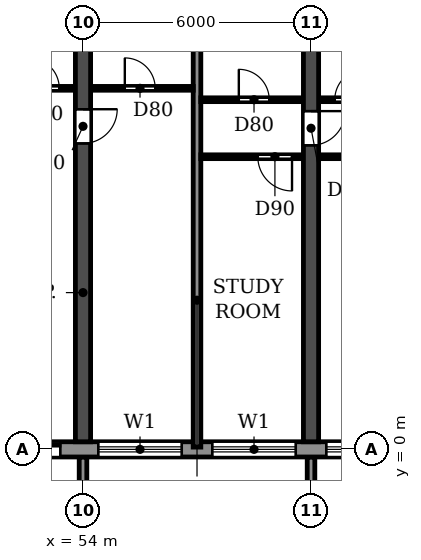
"""IFC4 building model, lengths in metres.
Left out: names, types, materials, properties, quantities, classifications, styles, units other than length and angle.
Written with IfcOpenShell. Run it as: python <this file> out.ifc"""

import sys

from ifc_helpers import new_model, si_unit, direction, frame, frame_2d, origin, place, context, subcontext, project, spatial, polyline, rectangle, outline, extrude, source, transform, mapped, element, fill, save


model = new_model("IFC4")
c1 = context("Model", 3, precision=1e-05, world=origin(), true_north=direction((0.0, 1.0)))
c2 = subcontext(c1, "Body", "Model", "MODEL_VIEW")
j1 = project(units=[si_unit("LENGTHUNIT", "METRE"), si_unit("PLANEANGLEUNIT", "RADIAN")], contexts=[c1])
p1 = place(None, origin())
s1 = spatial("IfcSite", under=j1, at=p1, CompositionType="ELEMENT")
p2 = place(p1, origin())
s2 = spatial("IfcBuilding", under=s1, at=p2, CompositionType="ELEMENT")
p3 = place(p2, frame((0.0, 0.0, 43.2)))
s3 = spatial("IfcBuildingStorey", under=s2, at=p3, CompositionType="ELEMENT", Elevation=43.2)
p4 = place(p3, frame((54.0, 0.2, 0.0), z_axis=(0.0, 0.0, 1.0), x_axis=(0.0, 1.0, 0.0)))
e1 = element("IfcWall", 1, at=p4, inside=s3, PredefinedType="SHEAR", context=c2, shape_type="SweptSolid", body=[
    extrude(rectangle(XDim=11.65, YDim=0.4, at=frame_2d((5.825, 0.0))), origin(), (0.0, 0.0, 1.0), 3.05),
])
p5 = place(p4, frame((7.85, 0.0, 0.0)))
e2 = element("IfcOpeningElement", 2, at=p5, cuts=e1, PredefinedType="OPENING", context=c2, shape_type="SweptSolid", body=[
    extrude(rectangle(XDim=0.9, YDim=2.1, at=frame_2d((0.45, 1.05))), frame((0.0, 0.21, 0.0), z_axis=(0.0, -1.0, 0.0), x_axis=(1.0, 0.0, 0.0)), (0.0, 0.0, 1.0), 0.42),
])
p6 = place(p3, frame((60.0, 0.2, 0.0), z_axis=(0.0, 0.0, 1.0), x_axis=(0.0, 1.0, 0.0)))
e3 = element("IfcWall", 3, at=p6, inside=s3, PredefinedType="SHEAR", context=c2, shape_type="SweptSolid", body=[
    extrude(rectangle(XDim=11.65, YDim=0.4, at=frame_2d((5.825, 0.0))), origin(), (0.0, 0.0, 1.0), 3.05),
])
p7 = place(p6, frame((7.8, 0.0, 0.0)))
e4 = element("IfcOpeningElement", 4, at=p7, cuts=e3, PredefinedType="OPENING", context=c2, shape_type="SweptSolid", body=[
    extrude(rectangle(XDim=0.9, YDim=2.1, at=frame_2d((0.45, 1.05))), frame((0.0, 0.21, 0.0), z_axis=(0.0, -1.0, 0.0), x_axis=(1.0, 0.0, 0.0)), (0.0, 0.0, 1.0), 0.42),
])
p8 = place(p3, frame((4.683, 0.0, 0.0), z_axis=(0.0, 0.0, 1.0), x_axis=(1.0, 0.0, 0.0)))
e5 = element("IfcWall", 5, at=p8, inside=s3, PredefinedType="STANDARD", context=c2, shape_type="SweptSolid", body=[
    extrude(rectangle(XDim=92.634, YDim=0.4, at=frame_2d((46.317, 0.0))), origin(), (0.0, 0.0, 1.0), 3.05),
])
p9 = place(p8, frame((1.717, 0.0, 0.9)))
e6 = element("IfcOpeningElement", 6, at=p9, cuts=e5, PredefinedType="OPENING", context=c2, shape_type="SweptSolid", body=[
    extrude(rectangle(XDim=2.2, YDim=1.5, at=frame_2d((1.1, 0.75))), frame((0.0, 0.21, 0.0), z_axis=(0.0, -1.0, 0.0), x_axis=(1.0, 0.0, 0.0)), (0.0, 0.0, 1.0), 0.42),
])
p10 = place(p8, frame((4.717, 0.0, 0.9)))
e7 = element("IfcOpeningElement", 7, at=p10, cuts=e5, PredefinedType="OPENING", context=c2, shape_type="SweptSolid", body=[
    extrude(rectangle(XDim=2.2, YDim=1.5, at=frame_2d((1.1, 0.75))), frame((0.0, 0.21, 0.0), z_axis=(0.0, -1.0, 0.0), x_axis=(1.0, 0.0, 0.0)), (0.0, 0.0, 1.0), 0.42),
])
p11 = place(p8, frame((7.717, 0.0, 0.9)))
e8 = element("IfcOpeningElement", 8, at=p11, cuts=e5, PredefinedType="OPENING", context=c2, shape_type="SweptSolid", body=[
    extrude(rectangle(XDim=2.2, YDim=1.5, at=frame_2d((1.1, 0.75))), frame((0.0, 0.21, 0.0), z_axis=(0.0, -1.0, 0.0), x_axis=(1.0, 0.0, 0.0)), (0.0, 0.0, 1.0), 0.42),
])
p12 = place(p8, frame((10.917, 0.0, 0.0)))
e9 = element("IfcOpeningElement", 9, at=p12, cuts=e5, PredefinedType="OPENING", context=c2, shape_type="SweptSolid", body=[
    extrude(rectangle(XDim=1.8, YDim=2.4, at=frame_2d((0.9, 1.2))), frame((0.0, 0.21, 0.0), z_axis=(0.0, -1.0, 0.0), x_axis=(1.0, 0.0, 0.0)), (0.0, 0.0, 1.0), 0.42),
])
p13 = place(p8, frame((13.717, 0.0, 0.9)))
e10 = element("IfcOpeningElement", 10, at=p13, cuts=e5, PredefinedType="OPENING", context=c2, shape_type="SweptSolid", body=[
    extrude(rectangle(XDim=2.2, YDim=1.5, at=frame_2d((1.1, 0.75))), frame((0.0, 0.21, 0.0), z_axis=(0.0, -1.0, 0.0), x_axis=(1.0, 0.0, 0.0)), (0.0, 0.0, 1.0), 0.42),
])
p14 = place(p8, frame((16.717, 0.0, 0.9)))
e11 = element("IfcOpeningElement", 11, at=p14, cuts=e5, PredefinedType="OPENING", context=c2, shape_type="SweptSolid", body=[
    extrude(rectangle(XDim=2.2, YDim=1.5, at=frame_2d((1.1, 0.75))), frame((0.0, 0.21, 0.0), z_axis=(0.0, -1.0, 0.0), x_axis=(1.0, 0.0, 0.0)), (0.0, 0.0, 1.0), 0.42),
])
p15 = place(p8, frame((19.917, 0.0, 0.0)))
e12 = element("IfcOpeningElement", 12, at=p15, cuts=e5, PredefinedType="OPENING", context=c2, shape_type="SweptSolid", body=[
    extrude(rectangle(XDim=1.8, YDim=2.4, at=frame_2d((0.9, 1.2))), frame((0.0, 0.21, 0.0), z_axis=(0.0, -1.0, 0.0), x_axis=(1.0, 0.0, 0.0)), (0.0, 0.0, 1.0), 0.42),
])
p16 = place(p8, frame((22.717, 0.0, 0.9)))
e13 = element("IfcOpeningElement", 13, at=p16, cuts=e5, PredefinedType="OPENING", context=c2, shape_type="SweptSolid", body=[
    extrude(rectangle(XDim=2.2, YDim=1.5, at=frame_2d((1.1, 0.75))), frame((0.0, 0.21, 0.0), z_axis=(0.0, -1.0, 0.0), x_axis=(1.0, 0.0, 0.0)), (0.0, 0.0, 1.0), 0.42),
])
p17 = place(p8, frame((25.717, 0.0, 0.9)))
e14 = element("IfcOpeningElement", 14, at=p17, cuts=e5, PredefinedType="OPENING", context=c2, shape_type="SweptSolid", body=[
    extrude(rectangle(XDim=2.2, YDim=1.5, at=frame_2d((1.1, 0.75))), frame((0.0, 0.21, 0.0), z_axis=(0.0, -1.0, 0.0), x_axis=(1.0, 0.0, 0.0)), (0.0, 0.0, 1.0), 0.42),
])
p18 = place(p8, frame((28.717, 0.0, 0.9)))
e15 = element("IfcOpeningElement", 15, at=p18, cuts=e5, PredefinedType="OPENING", context=c2, shape_type="SweptSolid", body=[
    extrude(rectangle(XDim=2.2, YDim=1.5, at=frame_2d((1.1, 0.75))), frame((0.0, 0.21, 0.0), z_axis=(0.0, -1.0, 0.0), x_axis=(1.0, 0.0, 0.0)), (0.0, 0.0, 1.0), 0.42),
])
p19 = place(p8, frame((31.717, 0.0, 0.9)))
e16 = element("IfcOpeningElement", 16, at=p19, cuts=e5, PredefinedType="OPENING", context=c2, shape_type="SweptSolid", body=[
    extrude(rectangle(XDim=2.2, YDim=1.5, at=frame_2d((1.1, 0.75))), frame((0.0, 0.21, 0.0), z_axis=(0.0, -1.0, 0.0), x_axis=(1.0, 0.0, 0.0)), (0.0, 0.0, 1.0), 0.42),
])
p20 = place(p8, frame((34.917, 0.0, 0.0)))
e17 = element("IfcOpeningElement", 17, at=p20, cuts=e5, PredefinedType="OPENING", context=c2, shape_type="SweptSolid", body=[
    extrude(rectangle(XDim=1.8, YDim=2.4, at=frame_2d((0.9, 1.2))), frame((0.0, 0.21, 0.0), z_axis=(0.0, -1.0, 0.0), x_axis=(1.0, 0.0, 0.0)), (0.0, 0.0, 1.0), 0.42),
])
p21 = place(p8, frame((37.717, 0.0, 0.9)))
e18 = element("IfcOpeningElement", 18, at=p21, cuts=e5, PredefinedType="OPENING", context=c2, shape_type="SweptSolid", body=[
    extrude(rectangle(XDim=2.2, YDim=1.5, at=frame_2d((1.1, 0.75))), frame((0.0, 0.21, 0.0), z_axis=(0.0, -1.0, 0.0), x_axis=(1.0, 0.0, 0.0)), (0.0, 0.0, 1.0), 0.42),
])
p22 = place(p8, frame((40.717, 0.0, 0.9)))
e19 = element("IfcOpeningElement", 19, at=p22, cuts=e5, PredefinedType="OPENING", context=c2, shape_type="SweptSolid", body=[
    extrude(rectangle(XDim=2.2, YDim=1.5, at=frame_2d((1.1, 0.75))), frame((0.0, 0.21, 0.0), z_axis=(0.0, -1.0, 0.0), x_axis=(1.0, 0.0, 0.0)), (0.0, 0.0, 1.0), 0.42),
])
p23 = place(p8, frame((43.717, 0.0, 0.9)))
e20 = element("IfcOpeningElement", 20, at=p23, cuts=e5, PredefinedType="OPENING", context=c2, shape_type="SweptSolid", body=[
    extrude(rectangle(XDim=2.2, YDim=1.5, at=frame_2d((1.1, 0.75))), frame((0.0, 0.21, 0.0), z_axis=(0.0, -1.0, 0.0), x_axis=(1.0, 0.0, 0.0)), (0.0, 0.0, 1.0), 0.42),
])
p24 = place(p8, frame((46.917, 0.0, 0.0)))
e21 = element("IfcOpeningElement", 21, at=p24, cuts=e5, PredefinedType="OPENING", context=c2, shape_type="SweptSolid", body=[
    extrude(rectangle(XDim=1.8, YDim=2.4, at=frame_2d((0.9, 1.2))), frame((0.0, 0.21, 0.0), z_axis=(0.0, -1.0, 0.0), x_axis=(1.0, 0.0, 0.0)), (0.0, 0.0, 1.0), 0.42),
])
p25 = place(p8, frame((49.717, 0.0, 0.9)))
e22 = element("IfcOpeningElement", 22, at=p25, cuts=e5, PredefinedType="OPENING", context=c2, shape_type="SweptSolid", body=[
    extrude(rectangle(XDim=2.2, YDim=1.5, at=frame_2d((1.1, 0.75))), frame((0.0, 0.21, 0.0), z_axis=(0.0, -1.0, 0.0), x_axis=(1.0, 0.0, 0.0)), (0.0, 0.0, 1.0), 0.42),
])
p26 = place(p8, frame((52.717, 0.0, 0.9)))
e23 = element("IfcOpeningElement", 23, at=p26, cuts=e5, PredefinedType="OPENING", context=c2, shape_type="SweptSolid", body=[
    extrude(rectangle(XDim=2.2, YDim=1.5, at=frame_2d((1.1, 0.75))), frame((0.0, 0.21, 0.0), z_axis=(0.0, -1.0, 0.0), x_axis=(1.0, 0.0, 0.0)), (0.0, 0.0, 1.0), 0.42),
])
p27 = place(p8, frame((55.717, 0.0, 0.9)))
e24 = element("IfcOpeningElement", 24, at=p27, cuts=e5, PredefinedType="OPENING", context=c2, shape_type="SweptSolid", body=[
    extrude(rectangle(XDim=2.2, YDim=1.5, at=frame_2d((1.1, 0.75))), frame((0.0, 0.21, 0.0), z_axis=(0.0, -1.0, 0.0), x_axis=(1.0, 0.0, 0.0)), (0.0, 0.0, 1.0), 0.42),
])
p28 = place(p8, frame((58.917, 0.0, 0.0)))
e25 = element("IfcOpeningElement", 25, at=p28, cuts=e5, PredefinedType="OPENING", context=c2, shape_type="SweptSolid", body=[
    extrude(rectangle(XDim=1.8, YDim=2.4, at=frame_2d((0.9, 1.2))), frame((0.0, 0.21, 0.0), z_axis=(0.0, -1.0, 0.0), x_axis=(1.0, 0.0, 0.0)), (0.0, 0.0, 1.0), 0.42),
])
p29 = place(p8, frame((61.717, 0.0, 0.9)))
e26 = element("IfcOpeningElement", 26, at=p29, cuts=e5, PredefinedType="OPENING", context=c2, shape_type="SweptSolid", body=[
    extrude(rectangle(XDim=2.2, YDim=1.5, at=frame_2d((1.1, 0.75))), frame((0.0, 0.21, 0.0), z_axis=(0.0, -1.0, 0.0), x_axis=(1.0, 0.0, 0.0)), (0.0, 0.0, 1.0), 0.42),
])
p30 = place(p8, frame((64.717, 0.0, 0.9)))
e27 = element("IfcOpeningElement", 27, at=p30, cuts=e5, PredefinedType="OPENING", context=c2, shape_type="SweptSolid", body=[
    extrude(rectangle(XDim=2.2, YDim=1.5, at=frame_2d((1.1, 0.75))), frame((0.0, 0.21, 0.0), z_axis=(0.0, -1.0, 0.0), x_axis=(1.0, 0.0, 0.0)), (0.0, 0.0, 1.0), 0.42),
])
p31 = place(p8, frame((67.717, 0.0, 0.9)))
e28 = element("IfcOpeningElement", 28, at=p31, cuts=e5, PredefinedType="OPENING", context=c2, shape_type="SweptSolid", body=[
    extrude(rectangle(XDim=2.2, YDim=1.5, at=frame_2d((1.1, 0.75))), frame((0.0, 0.21, 0.0), z_axis=(0.0, -1.0, 0.0), x_axis=(1.0, 0.0, 0.0)), (0.0, 0.0, 1.0), 0.42),
])
p32 = place(p8, frame((70.917, 0.0, 0.0)))
e29 = element("IfcOpeningElement", 29, at=p32, cuts=e5, PredefinedType="OPENING", context=c2, shape_type="SweptSolid", body=[
    extrude(rectangle(XDim=1.8, YDim=2.4, at=frame_2d((0.9, 1.2))), frame((0.0, 0.21, 0.0), z_axis=(0.0, -1.0, 0.0), x_axis=(1.0, 0.0, 0.0)), (0.0, 0.0, 1.0), 0.42),
])
p33 = place(p8, frame((73.717, 0.0, 0.9)))
e30 = element("IfcOpeningElement", 30, at=p33, cuts=e5, PredefinedType="OPENING", context=c2, shape_type="SweptSolid", body=[
    extrude(rectangle(XDim=2.2, YDim=1.5, at=frame_2d((1.1, 0.75))), frame((0.0, 0.21, 0.0), z_axis=(0.0, -1.0, 0.0), x_axis=(1.0, 0.0, 0.0)), (0.0, 0.0, 1.0), 0.42),
])
p34 = place(p8, frame((76.717, 0.0, 0.9)))
e31 = element("IfcOpeningElement", 31, at=p34, cuts=e5, PredefinedType="OPENING", context=c2, shape_type="SweptSolid", body=[
    extrude(rectangle(XDim=2.2, YDim=1.5, at=frame_2d((1.1, 0.75))), frame((0.0, 0.21, 0.0), z_axis=(0.0, -1.0, 0.0), x_axis=(1.0, 0.0, 0.0)), (0.0, 0.0, 1.0), 0.42),
])
p35 = place(p8, frame((79.717, 0.0, 0.9)))
e32 = element("IfcOpeningElement", 32, at=p35, cuts=e5, PredefinedType="OPENING", context=c2, shape_type="SweptSolid", body=[
    extrude(rectangle(XDim=2.2, YDim=1.5, at=frame_2d((1.1, 0.75))), frame((0.0, 0.21, 0.0), z_axis=(0.0, -1.0, 0.0), x_axis=(1.0, 0.0, 0.0)), (0.0, 0.0, 1.0), 0.42),
])
p36 = place(p8, frame((82.917, 0.0, 0.0)))
e33 = element("IfcOpeningElement", 33, at=p36, cuts=e5, PredefinedType="OPENING", context=c2, shape_type="SweptSolid", body=[
    extrude(rectangle(XDim=1.8, YDim=2.4, at=frame_2d((0.9, 1.2))), frame((0.0, 0.21, 0.0), z_axis=(0.0, -1.0, 0.0), x_axis=(1.0, 0.0, 0.0)), (0.0, 0.0, 1.0), 0.42),
])
p37 = place(p8, frame((85.717, 0.0, 0.9)))
e34 = element("IfcOpeningElement", 34, at=p37, cuts=e5, PredefinedType="OPENING", context=c2, shape_type="SweptSolid", body=[
    extrude(rectangle(XDim=2.2, YDim=1.5, at=frame_2d((1.1, 0.75))), frame((0.0, 0.21, 0.0), z_axis=(0.0, -1.0, 0.0), x_axis=(1.0, 0.0, 0.0)), (0.0, 0.0, 1.0), 0.42),
])
p38 = place(p8, frame((88.717, 0.0, 0.9)))
e35 = element("IfcOpeningElement", 35, at=p38, cuts=e5, PredefinedType="OPENING", context=c2, shape_type="SweptSolid", body=[
    extrude(rectangle(XDim=2.2, YDim=1.5, at=frame_2d((1.1, 0.75))), frame((0.0, 0.21, 0.0), z_axis=(0.0, -1.0, 0.0), x_axis=(1.0, 0.0, 0.0)), (0.0, 0.0, 1.0), 0.42),
])
m1 = source(origin(), c2, "Body", "SweptSolid", [
    extrude(outline(polyline([(0.0, 0.0), (0.2, 0.0), (0.2, 1.65), (0.0, 1.65), (0.0, 0.0)])), origin(), (0.0, 0.0, 1.0), 3.1),
])
for number, where in (
    (36, (53.9, -1.85, 0.0)),
    (37, (59.9, -1.85, 0.0)),
):
    element("IfcWall", number, at=place(p3, frame(where)), inside=s3, PredefinedType="STANDARD", context=c2, shape_type="MappedRepresentation", body=[
        mapped(m1, transform((0.0, 0.0, 0.0))),
    ])
p39 = place(p3, frame((57.0, 0.06, 0.0), z_axis=(0.0, 0.0, 1.0), x_axis=(0.0, 1.0, 0.0)))
e38 = element("IfcWall", 38, at=p39, inside=s3, PredefinedType="PARTITIONING", context=c2, shape_type="SweptSolid", body=[
    extrude(rectangle(XDim=11.78, YDim=0.2, at=frame_2d((5.89, 0.0))), origin(), (0.0, 0.0, 1.0), 3.05),
])
p40 = place(p3, frame((57.1, 7.7, 0.0), z_axis=(0.0, 0.0, 1.0), x_axis=(1.0, 0.0, 0.0)))
e39 = element("IfcWall", 39, at=p40, inside=s3, PredefinedType="PARTITIONING", context=c2, shape_type="SweptSolid", body=[
    extrude(rectangle(XDim=2.69, YDim=0.1, at=frame_2d((1.345, 0.0))), origin(), (0.0, 0.0, 1.0), 3.05),
])
p41 = place(p40, frame((1.5, 0.0, 0.0)))
e40 = element("IfcOpeningElement", 40, at=p41, cuts=e39, PredefinedType="OPENING", context=c2, shape_type="SweptSolid", body=[
    extrude(rectangle(XDim=0.9, YDim=2.1, at=frame_2d((0.45, 1.05))), frame((0.0, 0.06, 0.0), z_axis=(0.0, -1.0, 0.0), x_axis=(1.0, 0.0, 0.0)), (0.0, 0.0, 1.0), 0.12),
])
p42 = place(p3, frame((60.21, 7.7, 0.0), z_axis=(0.0, 0.0, 1.0), x_axis=(1.0, 0.0, 0.0)))
e41 = element("IfcWall", 41, at=p42, inside=s3, PredefinedType="PARTITIONING", context=c2, shape_type="SweptSolid", body=[
    extrude(rectangle(XDim=2.84, YDim=0.1, at=frame_2d((1.42, 0.0))), origin(), (0.0, 0.0, 1.0), 3.05),
])
p43 = place(p42, frame((1.39, 0.0, 0.0)))
e42 = element("IfcOpeningElement", 42, at=p43, cuts=e41, PredefinedType="OPENING", context=c2, shape_type="SweptSolid", body=[
    extrude(rectangle(XDim=0.9, YDim=2.1, at=frame_2d((0.45, 1.05))), frame((0.0, 0.06, 0.0), z_axis=(0.0, -1.0, 0.0), x_axis=(1.0, 0.0, 0.0)), (0.0, 0.0, 1.0), 0.12),
])
p44 = place(p3, frame((57.1, 9.2, 0.0), z_axis=(0.0, 0.0, 1.0), x_axis=(1.0, 0.0, 0.0)))
e43 = element("IfcWall", 43, at=p44, inside=s3, PredefinedType="PARTITIONING", context=c2, shape_type="SweptSolid", body=[
    extrude(rectangle(XDim=2.69, YDim=0.1, at=frame_2d((1.345, 0.0))), origin(), (0.0, 0.0, 1.0), 3.05),
])
p45 = place(p44, frame((1.0, 0.0, 0.0)))
e44 = element("IfcOpeningElement", 44, at=p45, cuts=e43, PredefinedType="OPENING", context=c2, shape_type="SweptSolid", body=[
    extrude(rectangle(XDim=0.8, YDim=2.1, at=frame_2d((0.4, 1.05))), frame((0.0, 0.06, 0.0), z_axis=(0.0, -1.0, 0.0), x_axis=(1.0, 0.0, 0.0)), (0.0, 0.0, 1.0), 0.12),
])
p46 = place(p3, frame((60.21, 9.2, 0.0), z_axis=(0.0, 0.0, 1.0), x_axis=(1.0, 0.0, 0.0)))
e45 = element("IfcWall", 45, at=p46, inside=s3, PredefinedType="PARTITIONING", context=c2, shape_type="SweptSolid", body=[
    extrude(rectangle(XDim=1.89, YDim=0.1, at=frame_2d((0.945, 0.0))), origin(), (0.0, 0.0, 1.0), 3.05),
])
p47 = place(p46, frame((0.415, 0.0, 0.0)))
e46 = element("IfcOpeningElement", 46, at=p47, cuts=e45, PredefinedType="OPENING", context=c2, shape_type="SweptSolid", body=[
    extrude(rectangle(XDim=0.8, YDim=2.1, at=frame_2d((0.4, 1.05))), frame((0.0, 0.06, 0.0), z_axis=(0.0, -1.0, 0.0), x_axis=(1.0, 0.0, 0.0)), (0.0, 0.0, 1.0), 0.12),
])
p48 = place(p3, frame((51.9, 9.5, 0.0), z_axis=(0.0, 0.0, 1.0), x_axis=(1.0, 0.0, 0.0)))
e47 = element("IfcWall", 47, at=p48, inside=s3, PredefinedType="PARTITIONING", context=c2, shape_type="SweptSolid", body=[
    extrude(rectangle(XDim=1.89, YDim=0.1, at=frame_2d((0.945, 0.0))), origin(), (0.0, 0.0, 1.0), 3.05),
])
p49 = place(p48, frame((0.675, 0.0, 0.0)))
e48 = element("IfcOpeningElement", 48, at=p49, cuts=e47, PredefinedType="OPENING", context=c2, shape_type="SweptSolid", body=[
    extrude(rectangle(XDim=0.8, YDim=2.1, at=frame_2d((0.4, 1.05))), frame((0.0, 0.06, 0.0), z_axis=(0.0, -1.0, 0.0), x_axis=(1.0, 0.0, 0.0)), (0.0, 0.0, 1.0), 0.12),
])
p50 = place(p3, frame((54.21, 9.5, 0.0), z_axis=(0.0, 0.0, 1.0), x_axis=(1.0, 0.0, 0.0)))
e49 = element("IfcWall", 49, at=p50, inside=s3, PredefinedType="PARTITIONING", context=c2, shape_type="SweptSolid", body=[
    extrude(rectangle(XDim=2.69, YDim=0.1, at=frame_2d((1.345, 0.0))), origin(), (0.0, 0.0, 1.0), 3.05),
])
p51 = place(p50, frame((0.89, 0.0, 0.0)))
e50 = element("IfcOpeningElement", 50, at=p51, cuts=e49, PredefinedType="OPENING", context=c2, shape_type="SweptSolid", body=[
    extrude(rectangle(XDim=0.8, YDim=2.1, at=frame_2d((0.4, 1.05))), frame((0.0, 0.06, 0.0), z_axis=(0.0, -1.0, 0.0), x_axis=(1.0, 0.0, 0.0)), (0.0, 0.0, 1.0), 0.12),
])
p52 = place(p24, origin())
e51 = element("IfcDoor", 51, at=p52, inside=s3, OperationType="DOUBLE_DOOR_SLIDING", PredefinedType="DOOR", context=c2, shape_type="SweptSolid", body=[
    extrude(rectangle(XDim=1.8, YDim=2.4, at=frame_2d((0.9, 1.2))), frame((0.0, 0.025, 0.0), z_axis=(0.0, -1.0, 0.0), x_axis=(1.0, 0.0, 0.0)), (0.0, 0.0, 1.0), 0.05),
])
fill(e21, e51)
p53 = place(p25, origin())
e52 = element("IfcWindow", 52, at=p53, inside=s3, PartitioningType="DOUBLE_PANEL_HORIZONTAL", PredefinedType="WINDOW", context=c2, shape_type="SweptSolid", body=[
    extrude(rectangle(XDim=2.2, YDim=1.5, at=frame_2d((1.1, 0.75))), frame((0.0, 0.03, 0.0), z_axis=(0.0, -1.0, 0.0), x_axis=(1.0, 0.0, 0.0)), (0.0, 0.0, 1.0), 0.06),
])
fill(e22, e52)
p54 = place(p26, origin())
e53 = element("IfcWindow", 53, at=p54, inside=s3, PartitioningType="DOUBLE_PANEL_HORIZONTAL", PredefinedType="WINDOW", context=c2, shape_type="SweptSolid", body=[
    extrude(rectangle(XDim=2.2, YDim=1.5, at=frame_2d((1.1, 0.75))), frame((0.0, 0.03, 0.0), z_axis=(0.0, -1.0, 0.0), x_axis=(1.0, 0.0, 0.0)), (0.0, 0.0, 1.0), 0.06),
])
fill(e23, e53)
p55 = place(p27, origin())
e54 = element("IfcWindow", 54, at=p55, inside=s3, PartitioningType="DOUBLE_PANEL_HORIZONTAL", PredefinedType="WINDOW", context=c2, shape_type="SweptSolid", body=[
    extrude(rectangle(XDim=2.2, YDim=1.5, at=frame_2d((1.1, 0.75))), frame((0.0, 0.03, 0.0), z_axis=(0.0, -1.0, 0.0), x_axis=(1.0, 0.0, 0.0)), (0.0, 0.0, 1.0), 0.06),
])
fill(e24, e54)
p56 = place(p51, origin())
e55 = element("IfcDoor", 55, at=p56, inside=s3, OperationType="SINGLE_SWING_LEFT", PredefinedType="DOOR", context=c2, shape_type="SweptSolid", body=[
    extrude(rectangle(XDim=0.8, YDim=2.1, at=frame_2d((0.4, 1.05))), frame((0.0, 0.025, 0.0), z_axis=(0.0, -1.0, 0.0), x_axis=(1.0, 0.0, 0.0)), (0.0, 0.0, 1.0), 0.05),
])
fill(e50, e55)
p57 = place(p49, origin())
e56 = element("IfcDoor", 56, at=p57, inside=s3, OperationType="SINGLE_SWING_LEFT", PredefinedType="DOOR", context=c2, shape_type="SweptSolid", body=[
    extrude(rectangle(XDim=0.8, YDim=2.1, at=frame_2d((0.4, 1.05))), frame((0.0, 0.025, 0.0), z_axis=(0.0, -1.0, 0.0), x_axis=(1.0, 0.0, 0.0)), (0.0, 0.0, 1.0), 0.05),
])
fill(e48, e56)
p58 = place(p5, frame((0.9, 0.0, 0.0), z_axis=(0.0, 0.0, 1.0), x_axis=(-1.0, 0.0, 0.0)))
e57 = element("IfcDoor", 57, at=p58, inside=s3, OperationType="SINGLE_SWING_LEFT", PredefinedType="DOOR", context=c2, shape_type="SweptSolid", body=[
    extrude(rectangle(XDim=0.9, YDim=2.1, at=frame_2d((0.45, 1.05))), frame((0.0, 0.025, 0.0), z_axis=(0.0, -1.0, 0.0), x_axis=(1.0, 0.0, 0.0)), (0.0, 0.0, 1.0), 0.05),
])
fill(e2, e57)
p59 = place(p45, origin())
e58 = element("IfcDoor", 58, at=p59, inside=s3, OperationType="SINGLE_SWING_LEFT", PredefinedType="DOOR", context=c2, shape_type="SweptSolid", body=[
    extrude(rectangle(XDim=0.8, YDim=2.1, at=frame_2d((0.4, 1.05))), frame((0.0, 0.025, 0.0), z_axis=(0.0, -1.0, 0.0), x_axis=(1.0, 0.0, 0.0)), (0.0, 0.0, 1.0), 0.05),
])
fill(e44, e58)
p60 = place(p41, frame((0.9, 0.0, 0.0), z_axis=(0.0, 0.0, 1.0), x_axis=(-1.0, 0.0, 0.0)))
e59 = element("IfcDoor", 59, at=p60, inside=s3, OperationType="SINGLE_SWING_LEFT", PredefinedType="DOOR", context=c2, shape_type="SweptSolid", body=[
    extrude(rectangle(XDim=0.9, YDim=2.1, at=frame_2d((0.45, 1.05))), frame((0.0, 0.025, 0.0), z_axis=(0.0, -1.0, 0.0), x_axis=(1.0, 0.0, 0.0)), (0.0, 0.0, 1.0), 0.05),
])
fill(e40, e59)
p61 = place(p7, frame((0.9, 0.0, 0.0), z_axis=(0.0, 0.0, 1.0), x_axis=(-1.0, 0.0, 0.0)))
e60 = element("IfcDoor", 60, at=p61, inside=s3, OperationType="SINGLE_SWING_LEFT", PredefinedType="DOOR", context=c2, shape_type="SweptSolid", body=[
    extrude(rectangle(XDim=0.9, YDim=2.1, at=frame_2d((0.45, 1.05))), frame((0.0, 0.025, 0.0), z_axis=(0.0, -1.0, 0.0), x_axis=(1.0, 0.0, 0.0)), (0.0, 0.0, 1.0), 0.05),
])
fill(e4, e60)
p62 = place(p47, origin())
e61 = element("IfcDoor", 61, at=p62, inside=s3, OperationType="SINGLE_SWING_RIGHT", PredefinedType="DOOR", context=c2, shape_type="SweptSolid", body=[
    extrude(rectangle(XDim=0.8, YDim=2.1, at=frame_2d((0.4, 1.05))), frame((0.0, 0.025, 0.0), z_axis=(0.0, -1.0, 0.0), x_axis=(1.0, 0.0, 0.0)), (0.0, 0.0, 1.0), 0.05),
])
fill(e46, e61)
save(model, sys.argv[1])
